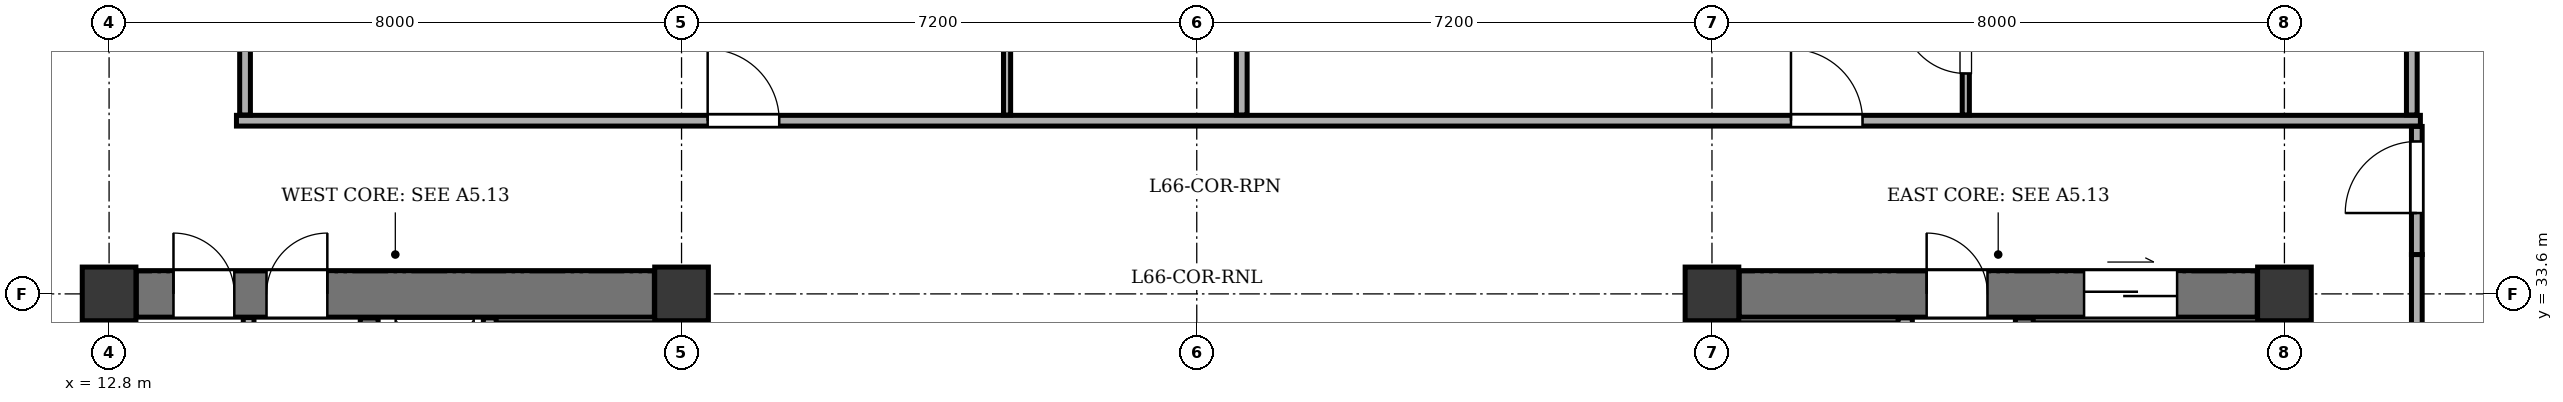
"""IFC4 building model, lengths in metres.
Left out: names, types, materials, properties, quantities, classifications, styles, units other than length and angle.
Written with IfcOpenShell. Run it as: python <this file> out.ifc"""

import sys

from ifc_helpers import new_model, si_unit, direction, frame, frame_2d, origin, origin_2d, place, context, subcontext, project, spatial, rectangle, extrude, element, fill, save


model = new_model("IFC4")
c1 = context("Model", 3, precision=1e-05, world=origin(), true_north=direction((0.0, 1.0)))
c2 = subcontext(c1, "Body", "Model", "MODEL_VIEW")
j1 = project(units=[si_unit("LENGTHUNIT", "METRE"), si_unit("PLANEANGLEUNIT", "RADIAN")], contexts=[c1])
p1 = place(None, origin())
s1 = spatial("IfcSite", under=j1, at=p1, CompositionType="ELEMENT")
p2 = place(p1, origin())
s2 = spatial("IfcBuilding", under=s1, at=p2, CompositionType="ELEMENT")
p3 = place(p2, frame((0.0, 0.0, 251.7)))
s3 = spatial("IfcBuildingStorey", under=s2, at=p3, CompositionType="ELEMENT", Elevation=251.7)
for number, where, z_axis, x_axis in (
    (1, (12.8, 33.6, 0.0), (0.0, 0.0, 1.0), (1.0, 0.0, 0.0)),
    (2, (20.8, 33.6, 0.0), (0.0, 0.0, 1.0), (1.0, 0.0, 0.0)),
    (3, (35.2, 33.6, 0.0), (0.0, 0.0, 1.0), (1.0, 0.0, 0.0)),
    (4, (43.2, 33.6, 0.0), (0.0, 0.0, 1.0), (1.0, 0.0, 0.0)),
):
    element("IfcColumn", number, at=place(p3, frame(where, z_axis=z_axis, x_axis=x_axis)), inside=s3, PredefinedType="COLUMN", context=c2, shape_type="SweptSolid", body=[
        extrude(rectangle(XDim=0.75, YDim=0.75, at=origin_2d()), origin(), (0.0, 0.0, 1.0), 3.4),
    ])
p4 = place(p3, frame((12.8, 21.18, 0.0), z_axis=(0.0, 0.0, 1.0), x_axis=(0.0, 1.0, 0.0)))
e5 = element("IfcWall", 5, at=p4, inside=s3, PredefinedType="SHEAR", context=c2, shape_type="SweptSolid", body=[
    extrude(rectangle(XDim=12.04, YDim=0.65, at=frame_2d((6.02, 0.0))), origin(), (0.0, 0.0, 1.0), 3.1),
])
p5 = place(p3, frame((13.18, 33.6, 0.0), z_axis=(0.0, 0.0, 1.0), x_axis=(1.0, 0.0, 0.0)))
e6 = element("IfcWall", 6, at=p5, inside=s3, PredefinedType="SHEAR", context=c2, shape_type="SweptSolid", body=[
    extrude(rectangle(XDim=7.24, YDim=0.65, at=frame_2d((3.62, 0.0))), origin(), (0.0, 0.0, 1.0), 3.1),
])
p6 = place(p5, frame((0.52, 0.0, 0.0)))
e7 = element("IfcOpeningElement", 7, at=p6, cuts=e6, PredefinedType="OPENING", context=c2, shape_type="SweptSolid", body=[
    extrude(rectangle(XDim=0.85, YDim=2.02, at=frame_2d((0.425, 1.01))), frame((0.0, 0.335, 0.0), z_axis=(0.0, -1.0, 0.0), x_axis=(1.0, 0.0, 0.0)), (0.0, 0.0, 1.0), 0.67),
])
p7 = place(p5, frame((1.82, 0.0, 0.0)))
e8 = element("IfcOpeningElement", 8, at=p7, cuts=e6, PredefinedType="OPENING", context=c2, shape_type="SweptSolid", body=[
    extrude(rectangle(XDim=0.85, YDim=2.02, at=frame_2d((0.425, 1.01))), frame((0.0, 0.335, 0.0), z_axis=(0.0, -1.0, 0.0), x_axis=(1.0, 0.0, 0.0)), (0.0, 0.0, 1.0), 0.67),
])
p8 = place(p3, frame((20.8, 31.1, 0.0), z_axis=(0.0, 0.0, 1.0), x_axis=(0.0, 1.0, 0.0)))
e9 = element("IfcWall", 9, at=p8, inside=s3, PredefinedType="SHEAR", context=c2, shape_type="SweptSolid", body=[
    extrude(rectangle(XDim=2.12, YDim=0.65, at=frame_2d((1.06, 0.0))), origin(), (0.0, 0.0, 1.0), 3.1),
])
p9 = place(p8, frame((0.4, 0.0, 0.0)))
e10 = element("IfcOpeningElement", 10, at=p9, cuts=e9, PredefinedType="OPENING", context=c2, shape_type="SweptSolid", body=[
    extrude(rectangle(XDim=1.1, YDim=2.1, at=frame_2d((0.55, 1.05))), frame((0.0, 0.335, 0.0), z_axis=(0.0, -1.0, 0.0), x_axis=(1.0, 0.0, 0.0)), (0.0, 0.0, 1.0), 0.67),
])
p10 = place(p3, frame((16.435, 21.135, 0.0), z_axis=(0.0, 0.0, 1.0), x_axis=(0.0, 1.0, 0.0)))
e11 = element("IfcWall", 11, at=p10, inside=s3, PredefinedType="SHEAR", context=c2, shape_type="SweptSolid", body=[
    extrude(rectangle(XDim=12.13, YDim=0.25, at=frame_2d((6.065, 0.0))), origin(), (0.0, 0.0, 1.0), 3.1),
])
p11 = place(p10, frame((0.515, 0.0, 0.0)))
e12 = element("IfcOpeningElement", 12, at=p11, cuts=e11, PredefinedType="OPENING", context=c2, shape_type="SweptSolid", body=[
    extrude(rectangle(XDim=1.2, YDim=2.15, at=frame_2d((0.6, 1.075))), frame((0.0, 0.135, 0.0), z_axis=(0.0, -1.0, 0.0), x_axis=(1.0, 0.0, 0.0)), (0.0, 0.0, 1.0), 0.27),
])
p12 = place(p10, frame((2.665, 0.0, 0.0)))
e13 = element("IfcOpeningElement", 13, at=p12, cuts=e11, PredefinedType="OPENING", context=c2, shape_type="SweptSolid", body=[
    extrude(rectangle(XDim=1.15, YDim=2.15, at=frame_2d((0.575, 1.075))), frame((0.0, 0.135, 0.0), z_axis=(0.0, -1.0, 0.0), x_axis=(1.0, 0.0, 0.0)), (0.0, 0.0, 1.0), 0.27),
])
p13 = place(p3, frame((18.12, 31.17, 0.0), z_axis=(0.0, 0.0, 1.0), x_axis=(0.0, 1.0, 0.0)))
e14 = element("IfcWall", 14, at=p13, inside=s3, PredefinedType="PARTITIONING", context=c2, shape_type="SweptSolid", body=[
    extrude(rectangle(XDim=2.095, YDim=0.18, at=frame_2d((1.047, 0.0))), origin(), (0.0, 0.0, 1.0), 3.1),
])
p14 = place(p3, frame((43.2, 21.18, 0.0), z_axis=(0.0, 0.0, 1.0), x_axis=(0.0, 1.0, 0.0)))
e15 = element("IfcWall", 15, at=p14, inside=s3, PredefinedType="SHEAR", context=c2, shape_type="SweptSolid", body=[
    extrude(rectangle(XDim=12.04, YDim=0.65, at=frame_2d((6.02, 0.0))), origin(), (0.0, 0.0, 1.0), 3.1),
])
p15 = place(p3, frame((35.58, 33.6, 0.0), z_axis=(0.0, 0.0, 1.0), x_axis=(1.0, 0.0, 0.0)))
e16 = element("IfcWall", 16, at=p15, inside=s3, PredefinedType="SHEAR", context=c2, shape_type="SweptSolid", body=[
    extrude(rectangle(XDim=7.24, YDim=0.65, at=frame_2d((3.62, 0.0))), origin(), (0.0, 0.0, 1.0), 3.1),
])
p16 = place(p15, frame((4.82, 0.0, 0.0)))
e17 = element("IfcOpeningElement", 17, at=p16, cuts=e16, PredefinedType="OPENING", context=c2, shape_type="SweptSolid", body=[
    extrude(rectangle(XDim=1.3, YDim=2.15, at=frame_2d((0.65, 1.075))), frame((0.0, 0.335, 0.0), z_axis=(0.0, -1.0, 0.0), x_axis=(1.0, 0.0, 0.0)), (0.0, 0.0, 1.0), 0.67),
])
p17 = place(p15, frame((2.62, 0.0, 0.0)))
e18 = element("IfcOpeningElement", 18, at=p17, cuts=e16, PredefinedType="OPENING", context=c2, shape_type="SweptSolid", body=[
    extrude(rectangle(XDim=0.85, YDim=2.02, at=frame_2d((0.425, 1.01))), frame((0.0, 0.335, 0.0), z_axis=(0.0, -1.0, 0.0), x_axis=(1.0, 0.0, 0.0)), (0.0, 0.0, 1.0), 0.67),
])
p18 = place(p3, frame((35.2, 31.1, 0.0), z_axis=(0.0, 0.0, 1.0), x_axis=(0.0, 1.0, 0.0)))
e19 = element("IfcWall", 19, at=p18, inside=s3, PredefinedType="SHEAR", context=c2, shape_type="SweptSolid", body=[
    extrude(rectangle(XDim=2.12, YDim=0.65, at=frame_2d((1.06, 0.0))), origin(), (0.0, 0.0, 1.0), 3.1),
])
p19 = place(p18, frame((0.4, 0.0, 0.0)))
e20 = element("IfcOpeningElement", 20, at=p19, cuts=e19, PredefinedType="OPENING", context=c2, shape_type="SweptSolid", body=[
    extrude(rectangle(XDim=1.1, YDim=2.1, at=frame_2d((0.55, 1.05))), frame((0.0, 0.335, 0.0), z_axis=(0.0, -1.0, 0.0), x_axis=(1.0, 0.0, 0.0)), (0.0, 0.0, 1.0), 0.67),
])
p20 = place(p3, frame((39.565, 21.135, 0.0), z_axis=(0.0, 0.0, 1.0), x_axis=(0.0, 1.0, 0.0)))
e21 = element("IfcWall", 21, at=p20, inside=s3, PredefinedType="SHEAR", context=c2, shape_type="SweptSolid", body=[
    extrude(rectangle(XDim=12.13, YDim=0.25, at=frame_2d((6.065, 0.0))), origin(), (0.0, 0.0, 1.0), 3.1),
])
p21 = place(p20, frame((0.515, 0.0, 0.0)))
e22 = element("IfcOpeningElement", 22, at=p21, cuts=e21, PredefinedType="OPENING", context=c2, shape_type="SweptSolid", body=[
    extrude(rectangle(XDim=1.2, YDim=2.15, at=frame_2d((0.6, 1.075))), frame((0.0, 0.135, 0.0), z_axis=(0.0, -1.0, 0.0), x_axis=(1.0, 0.0, 0.0)), (0.0, 0.0, 1.0), 0.27),
])
p22 = place(p20, frame((2.665, 0.0, 0.0)))
e23 = element("IfcOpeningElement", 23, at=p22, cuts=e21, PredefinedType="OPENING", context=c2, shape_type="SweptSolid", body=[
    extrude(rectangle(XDim=1.15, YDim=2.15, at=frame_2d((0.575, 1.075))), frame((0.0, 0.135, 0.0), z_axis=(0.0, -1.0, 0.0), x_axis=(1.0, 0.0, 0.0)), (0.0, 0.0, 1.0), 0.27),
])
p23 = place(p3, frame((37.9, 25.27, 0.0), z_axis=(0.0, 0.0, 1.0), x_axis=(0.0, 1.0, 0.0)))
e24 = element("IfcWall", 24, at=p23, inside=s3, PredefinedType="SOLIDWALL", context=c2, shape_type="SweptSolid", body=[
    extrude(rectangle(XDim=7.995, YDim=0.2, at=frame_2d((3.998, 0.0))), origin(), (0.0, 0.0, 1.0), 3.1),
])
p24 = place(p3, frame((14.75, 30.96, 0.0), z_axis=(0.0, 0.0, 1.0), x_axis=(0.0, 1.0, 0.0)))
e25 = element("IfcWall", 25, at=p24, inside=s3, PredefinedType="PARTITIONING", context=c2, shape_type="SweptSolid", body=[
    extrude(rectangle(XDim=2.31, YDim=0.15, at=frame_2d((1.155, 0.0))), origin(), (0.0, 0.0, 1.0), 3.1),
])
p25 = place(p24, frame((0.47, 0.0, 0.0)))
e26 = element("IfcOpeningElement", 26, at=p25, cuts=e25, PredefinedType="OPENING", context=c2, shape_type="SweptSolid", body=[
    extrude(rectangle(XDim=0.85, YDim=2.02, at=frame_2d((0.425, 1.01))), frame((0.0, 0.085, 0.0), z_axis=(0.0, -1.0, 0.0), x_axis=(1.0, 0.0, 0.0)), (0.0, 0.0, 1.0), 0.17),
])
p26 = place(p3, frame((14.58, 36.02, 0.0), z_axis=(0.0, 0.0, 1.0), x_axis=(1.0, 0.0, 0.0)))
e27 = element("IfcWall", 27, at=p26, inside=s3, PredefinedType="PARTITIONING", context=c2, shape_type="SweptSolid", body=[
    extrude(rectangle(XDim=30.52, YDim=0.15, at=frame_2d((15.26, 0.0))), origin(), (0.0, 0.0, 1.0), 3.1),
])
p27 = place(p26, frame((6.585, 0.0, 0.0)))
e28 = element("IfcOpeningElement", 28, at=p27, cuts=e27, PredefinedType="OPENING", context=c2, shape_type="SweptSolid", body=[
    extrude(rectangle(XDim=1.0, YDim=2.1, at=frame_2d((0.5, 1.05))), frame((0.0, 0.085, 0.0), z_axis=(0.0, -1.0, 0.0), x_axis=(1.0, 0.0, 0.0)), (0.0, 0.0, 1.0), 0.17),
])
p28 = place(p26, frame((21.724, 0.0, 0.0)))
e29 = element("IfcOpeningElement", 29, at=p28, cuts=e27, PredefinedType="OPENING", context=c2, shape_type="SweptSolid", body=[
    extrude(rectangle(XDim=1.0, YDim=2.1, at=frame_2d((0.5, 1.05))), frame((0.0, 0.085, 0.0), z_axis=(0.0, -1.0, 0.0), x_axis=(1.0, 0.0, 0.0)), (0.0, 0.0, 1.0), 0.17),
])
p29 = place(p3, frame((14.7, 36.1, 0.0), z_axis=(0.0, 0.0, 1.0), x_axis=(0.0, 1.0, 0.0)))
e30 = element("IfcWall", 30, at=p29, inside=s3, PredefinedType="PARTITIONING", context=c2, shape_type="SweptSolid", body=[
    extrude(rectangle(XDim=8.655, YDim=0.15, at=frame_2d((4.327, 0.0))), origin(), (0.0, 0.0, 1.0), 3.1),
])
p30 = place(p3, frame((25.349, 36.1, 0.0), z_axis=(0.0, 0.0, 1.0), x_axis=(0.0, 1.0, 0.0)))
e31 = element("IfcWall", 31, at=p30, inside=s3, PredefinedType="PARTITIONING", context=c2, shape_type="SweptSolid", body=[
    extrude(rectangle(XDim=6.095, YDim=0.1, at=frame_2d((3.047, 0.0))), origin(), (0.0, 0.0, 1.0), 3.1),
])
p31 = place(p30, frame((2.585, 0.0, 0.0)))
e32 = element("IfcOpeningElement", 32, at=p31, cuts=e31, PredefinedType="OPENING", context=c2, shape_type="SweptSolid", body=[
    extrude(rectangle(XDim=0.9, YDim=2.05, at=frame_2d((0.45, 1.025))), frame((0.0, 0.06, 0.0), z_axis=(0.0, -1.0, 0.0), x_axis=(1.0, 0.0, 0.0)), (0.0, 0.0, 1.0), 0.12),
])
p32 = place(p3, frame((28.629, 36.1, 0.0), z_axis=(0.0, 0.0, 1.0), x_axis=(0.0, 1.0, 0.0)))
e33 = element("IfcWall", 33, at=p32, inside=s3, PredefinedType="PARTITIONING", context=c2, shape_type="SweptSolid", body=[
    extrude(rectangle(XDim=8.655, YDim=0.15, at=frame_2d((4.327, 0.0))), origin(), (0.0, 0.0, 1.0), 3.1),
])
p33 = place(p3, frame((38.747, 36.1, 0.0), z_axis=(0.0, 0.0, 1.0), x_axis=(0.0, 1.0, 0.0)))
e34 = element("IfcWall", 34, at=p33, inside=s3, PredefinedType="PARTITIONING", context=c2, shape_type="SweptSolid", body=[
    extrude(rectangle(XDim=6.095, YDim=0.1, at=frame_2d((3.047, 0.0))), origin(), (0.0, 0.0, 1.0), 3.1),
])
p34 = place(p33, frame((0.58, 0.0, 0.0)))
e35 = element("IfcOpeningElement", 35, at=p34, cuts=e34, PredefinedType="OPENING", context=c2, shape_type="SweptSolid", body=[
    extrude(rectangle(XDim=0.9, YDim=2.05, at=frame_2d((0.45, 1.025))), frame((0.0, 0.06, 0.0), z_axis=(0.0, -1.0, 0.0), x_axis=(1.0, 0.0, 0.0)), (0.0, 0.0, 1.0), 0.12),
])
p35 = place(p3, frame((44.98, 36.1, 0.0), z_axis=(0.0, 0.0, 1.0), x_axis=(0.0, 1.0, 0.0)))
e36 = element("IfcWall", 36, at=p35, inside=s3, PredefinedType="PARTITIONING", context=c2, shape_type="SweptSolid", body=[
    extrude(rectangle(XDim=8.655, YDim=0.15, at=frame_2d((4.327, 0.0))), origin(), (0.0, 0.0, 1.0), 2.725),
])
p36 = place(p3, frame((45.05, 20.25, 0.0), z_axis=(0.0, 0.0, 1.0), x_axis=(0.0, 1.0, 0.0)))
e37 = element("IfcWall", 37, at=p36, inside=s3, PredefinedType="PARTITIONING", context=c2, shape_type="SweptSolid", body=[
    extrude(rectangle(XDim=13.9, YDim=0.15, at=frame_2d((6.95, 0.0))), origin(), (0.0, 0.0, 1.0), 2.725),
])
p37 = place(p3, frame((45.05, 34.15, 0.0), z_axis=(0.0, 0.0, 1.0), x_axis=(0.0, 1.0, 0.0)))
e38 = element("IfcWall", 38, at=p37, inside=s3, PredefinedType="PARTITIONING", context=c2, shape_type="SweptSolid", body=[
    extrude(rectangle(XDim=1.79, YDim=0.15, at=frame_2d((0.895, 0.0))), origin(), (0.0, 0.0, 1.0), 2.725),
])
p38 = place(p37, frame((0.58, 0.0, 0.0)))
e39 = element("IfcOpeningElement", 39, at=p38, cuts=e38, PredefinedType="OPENING", context=c2, shape_type="SweptSolid", body=[
    extrude(rectangle(XDim=1.0, YDim=2.1, at=frame_2d((0.5, 1.05))), frame((0.0, 0.085, 0.0), z_axis=(0.0, -1.0, 0.0), x_axis=(1.0, 0.0, 0.0)), (0.0, 0.0, 1.0), 0.17),
])
p39 = place(p6, origin())
e40 = element("IfcDoor", 40, at=p39, inside=s3, OperationType="SINGLE_SWING_LEFT", PredefinedType="DOOR", context=c2, shape_type="SweptSolid", body=[
    extrude(rectangle(XDim=0.85, YDim=2.02, at=frame_2d((0.425, 1.01))), frame((0.0, 0.025, 0.0), z_axis=(0.0, -1.0, 0.0), x_axis=(1.0, 0.0, 0.0)), (0.0, 0.0, 1.0), 0.05),
])
fill(e7, e40)
p40 = place(p7, origin())
e41 = element("IfcDoor", 41, at=p40, inside=s3, OperationType="SINGLE_SWING_RIGHT", PredefinedType="DOOR", context=c2, shape_type="SweptSolid", body=[
    extrude(rectangle(XDim=0.85, YDim=2.02, at=frame_2d((0.425, 1.01))), frame((0.0, 0.025, 0.0), z_axis=(0.0, -1.0, 0.0), x_axis=(1.0, 0.0, 0.0)), (0.0, 0.0, 1.0), 0.05),
])
fill(e8, e41)
p41 = place(p16, origin())
e42 = element("IfcDoor", 42, at=p41, inside=s3, OperationType="DOUBLE_DOOR_SLIDING", PredefinedType="DOOR", context=c2, shape_type="SweptSolid", body=[
    extrude(rectangle(XDim=1.3, YDim=2.15, at=frame_2d((0.65, 1.075))), frame((0.0, 0.025, 0.0), z_axis=(0.0, -1.0, 0.0), x_axis=(1.0, 0.0, 0.0)), (0.0, 0.0, 1.0), 0.05),
])
fill(e17, e42)
p42 = place(p17, origin())
e43 = element("IfcDoor", 43, at=p42, inside=s3, OperationType="SINGLE_SWING_LEFT", PredefinedType="DOOR", context=c2, shape_type="SweptSolid", body=[
    extrude(rectangle(XDim=0.85, YDim=2.02, at=frame_2d((0.425, 1.01))), frame((0.0, 0.025, 0.0), z_axis=(0.0, -1.0, 0.0), x_axis=(1.0, 0.0, 0.0)), (0.0, 0.0, 1.0), 0.05),
])
fill(e18, e43)
p43 = place(p27, origin())
e44 = element("IfcDoor", 44, at=p43, inside=s3, OperationType="SINGLE_SWING_LEFT", PredefinedType="DOOR", context=c2, shape_type="SweptSolid", body=[
    extrude(rectangle(XDim=1.0, YDim=2.1, at=frame_2d((0.5, 1.05))), frame((0.0, 0.025, 0.0), z_axis=(0.0, -1.0, 0.0), x_axis=(1.0, 0.0, 0.0)), (0.0, 0.0, 1.0), 0.05),
])
fill(e28, e44)
p44 = place(p28, origin())
e45 = element("IfcDoor", 45, at=p44, inside=s3, OperationType="SINGLE_SWING_LEFT", PredefinedType="DOOR", context=c2, shape_type="SweptSolid", body=[
    extrude(rectangle(XDim=1.0, YDim=2.1, at=frame_2d((0.5, 1.05))), frame((0.0, 0.025, 0.0), z_axis=(0.0, -1.0, 0.0), x_axis=(1.0, 0.0, 0.0)), (0.0, 0.0, 1.0), 0.05),
])
fill(e29, e45)
p45 = place(p34, origin())
e46 = element("IfcDoor", 46, at=p45, inside=s3, OperationType="SINGLE_SWING_RIGHT", PredefinedType="DOOR", context=c2, shape_type="SweptSolid", body=[
    extrude(rectangle(XDim=0.9, YDim=2.05, at=frame_2d((0.45, 1.025))), frame((0.0, 0.025, 0.0), z_axis=(0.0, -1.0, 0.0), x_axis=(1.0, 0.0, 0.0)), (0.0, 0.0, 1.0), 0.05),
])
fill(e35, e46)
p46 = place(p38, origin())
e47 = element("IfcDoor", 47, at=p46, inside=s3, OperationType="SINGLE_SWING_LEFT", PredefinedType="DOOR", context=c2, shape_type="SweptSolid", body=[
    extrude(rectangle(XDim=1.0, YDim=2.1, at=frame_2d((0.5, 1.05))), frame((0.0, 0.025, 0.0), z_axis=(0.0, -1.0, 0.0), x_axis=(1.0, 0.0, 0.0)), (0.0, 0.0, 1.0), 0.05),
])
fill(e39, e47)
save(model, sys.argv[1])
